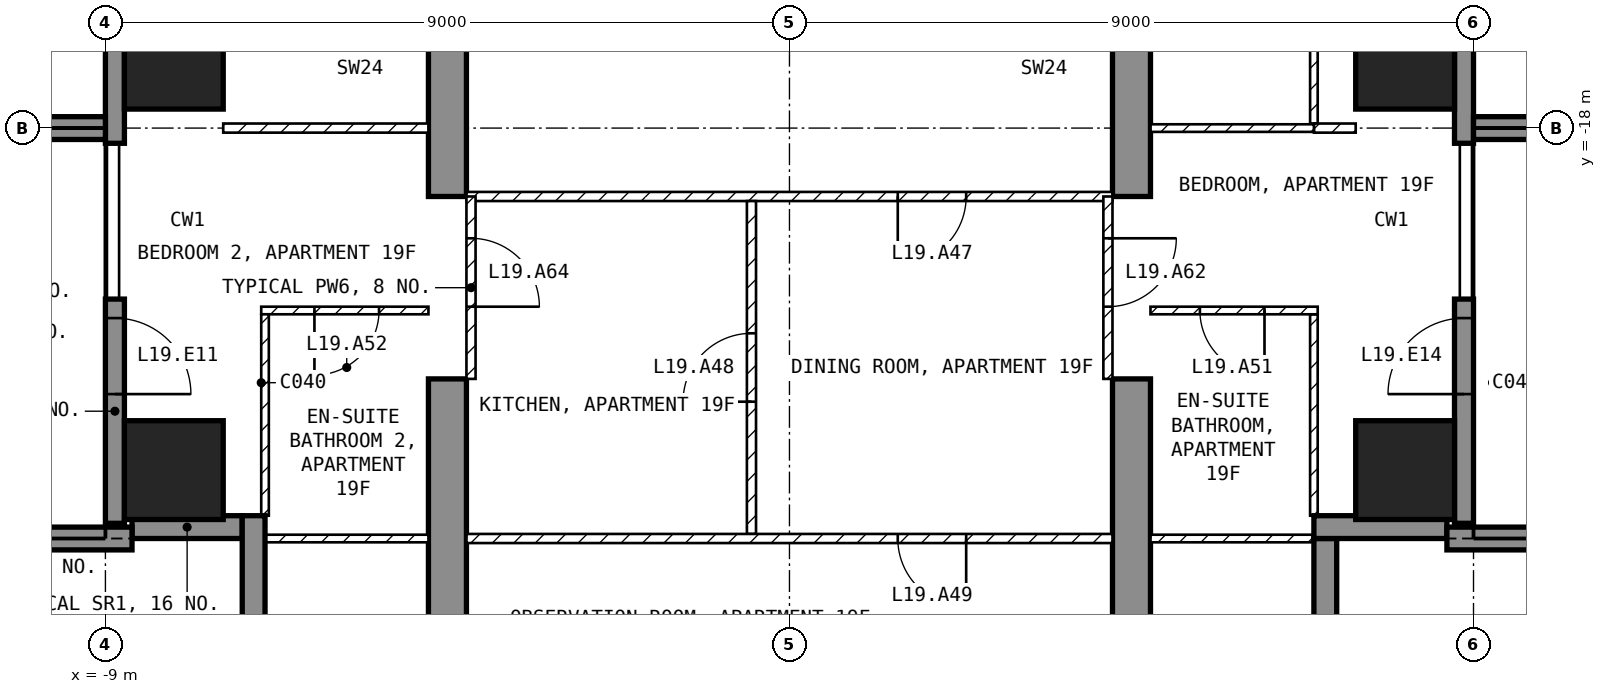
"""IFC4 building model, lengths in metres.
Left out: names, types, materials, properties, quantities, classifications, styles, units other than length and angle.
Written with IfcOpenShell. Run it as: python <this file> out.ifc"""

import sys

from ifc_helpers import new_model, si_unit, direction, frame, frame_2d, origin, origin_2d, place, context, subcontext, project, spatial, polyline, rectangle, outline, extrude, element, fill, save


model = new_model("IFC4")
c1 = context("Model", 3, precision=1e-05, world=origin(), true_north=direction((0.0, 1.0)))
c2 = subcontext(c1, "Body", "Model", "MODEL_VIEW")
j1 = project(units=[si_unit("LENGTHUNIT", "METRE"), si_unit("PLANEANGLEUNIT", "RADIAN")], contexts=[c1])
p1 = place(None, origin())
s1 = spatial("IfcSite", under=j1, at=p1, CompositionType="ELEMENT")
p2 = place(p1, origin())
s2 = spatial("IfcBuilding", under=s1, at=p2, CompositionType="ELEMENT")
p3 = place(p2, frame((0.0, 0.0, 85.5)))
s3 = spatial("IfcBuildingStorey", under=s2, at=p3, CompositionType="ELEMENT", Elevation=85.5)
for number, where, z_axis, x_axis in (
    (1, (-8.1, -22.5, -0.25), (0.0, 0.0, 1.0), (1.0, 0.0, 0.0)),
    (2, (-8.1, -17.1, -0.25), (0.0, 0.0, 1.0), (1.0, 0.0, 0.0)),
    (3, (8.1, -22.5, -0.25), (0.0, 0.0, 1.0), (1.0, 0.0, 0.0)),
    (4, (8.1, -17.1, -0.25), (0.0, 0.0, 1.0), (1.0, 0.0, 0.0)),
):
    element("IfcColumn", number, at=place(p3, frame(where, z_axis=z_axis, x_axis=x_axis)), inside=s3, PredefinedType="COLUMN", context=c2, shape_type="SweptSolid", body=[
        extrude(rectangle(XDim=1.3, YDim=1.3, at=origin_2d()), origin(), (0.0, 0.0, 1.0), 3.5),
    ])
for number, where, z_axis, x_axis in (
    (5, (-4.75, -25.45, -0.25), (1.0, 0.0, 0.0), (0.0, 1.0, 0.0)),
    (6, (4.25, -25.45, -0.25), (1.0, 0.0, 0.0), (0.0, 1.0, 0.0)),
):
    element("IfcWall", number, at=place(p3, frame(where, z_axis=z_axis, x_axis=x_axis)), inside=s3, PredefinedType="SHEAR", context=c2, shape_type="SweptSolid", body=[
        extrude(outline(polyline([(0.0, 0.0), (4.15, 0.0), (4.15, 2.65), (6.55, 2.65), (6.55, 0.0), (11.95, 0.0), (11.95, 2.65), (14.35, 2.65), (14.35, 0.0), (16.45, 0.0), (16.45, 3.5), (0.0, 3.5), (0.0, 0.0)])), origin(), (0.0, 0.0, 1.0), 0.5),
    ])
p4 = place(p3, frame((-8.875, -14.65, 0.0), z_axis=(0.0, 0.0, 1.0), x_axis=(0.0, -1.0, 0.0)))
e7 = element("IfcWall", 7, at=p4, inside=s3, PredefinedType="SOLIDWALL", context=c2, shape_type="SweptSolid", body=[
    extrude(rectangle(XDim=3.55, YDim=0.25, at=frame_2d((1.775, 0.0))), origin(), (0.0, 0.0, 1.0), 3.25),
])
p5 = place(p4, frame((0.25, 0.0, 0.0)))
e8 = element("IfcOpeningElement", 8, at=p5, cuts=e7, PredefinedType="OPENING", context=c2, shape_type="SweptSolid", body=[
    extrude(rectangle(XDim=1.2, YDim=2.4, at=frame_2d((0.6, 1.2))), frame((0.0, 0.135, 0.0), z_axis=(0.0, -1.0, 0.0), x_axis=(1.0, 0.0, 0.0)), (0.0, 0.0, 1.0), 0.27),
])
p6 = place(p3, frame((-8.875, -20.25, 0.0), z_axis=(0.0, 0.0, 1.0), x_axis=(0.0, -1.0, 0.0)))
e9 = element("IfcWall", 9, at=p6, inside=s3, PredefinedType="SOLIDWALL", context=c2, shape_type="SweptSolid", body=[
    extrude(rectangle(XDim=2.95, YDim=0.25, at=frame_2d((1.475, 0.0))), origin(), (0.0, 0.0, 1.0), 3.25),
])
p7 = place(p6, frame((0.25, 0.0, 0.0)))
e10 = element("IfcOpeningElement", 10, at=p7, cuts=e9, PredefinedType="OPENING", context=c2, shape_type="SweptSolid", body=[
    extrude(rectangle(XDim=1.0, YDim=2.4, at=frame_2d((0.5, 1.2))), frame((0.0, 0.135, 0.0), z_axis=(0.0, -1.0, 0.0), x_axis=(1.0, 0.0, 0.0)), (0.0, 0.0, 1.0), 0.27),
])
p8 = place(p3, frame((8.875, -23.2, 0.0), z_axis=(0.0, 0.0, 1.0), x_axis=(0.0, 1.0, 0.0)))
e11 = element("IfcWall", 11, at=p8, inside=s3, PredefinedType="SOLIDWALL", context=c2, shape_type="SweptSolid", body=[
    extrude(rectangle(XDim=2.95, YDim=0.25, at=frame_2d((1.475, 0.0))), origin(), (0.0, 0.0, 1.0), 3.25),
])
p9 = place(p8, frame((1.7, 0.0, 0.0)))
e12 = element("IfcOpeningElement", 12, at=p9, cuts=e11, PredefinedType="OPENING", context=c2, shape_type="SweptSolid", body=[
    extrude(rectangle(XDim=1.0, YDim=2.4, at=frame_2d((0.5, 1.2))), frame((0.0, 0.135, 0.0), z_axis=(0.0, -1.0, 0.0), x_axis=(1.0, 0.0, 0.0)), (0.0, 0.0, 1.0), 0.27),
])
p10 = place(p3, frame((8.875, -18.2, 0.0), z_axis=(0.0, 0.0, 1.0), x_axis=(0.0, 1.0, 0.0)))
e13 = element("IfcWall", 13, at=p10, inside=s3, PredefinedType="SOLIDWALL", context=c2, shape_type="SweptSolid", body=[
    extrude(rectangle(XDim=3.55, YDim=0.25, at=frame_2d((1.775, 0.0))), origin(), (0.0, 0.0, 1.0), 3.25),
])
p11 = place(p10, frame((2.1, 0.0, 0.0)))
e14 = element("IfcOpeningElement", 14, at=p11, cuts=e13, PredefinedType="OPENING", context=c2, shape_type="SweptSolid", body=[
    extrude(rectangle(XDim=1.2, YDim=2.4, at=frame_2d((0.6, 1.2))), frame((0.0, 0.135, 0.0), z_axis=(0.0, -1.0, 0.0), x_axis=(1.0, 0.0, 0.0)), (0.0, 0.0, 1.0), 0.27),
])
p12 = place(p3, frame((7.05, -25.2, 0.0), z_axis=(0.0, 0.0, 1.0), x_axis=(0.0, 1.0, 0.0)))
e15 = element("IfcWall", 15, at=p12, inside=s3, PredefinedType="SOLIDWALL", context=c2, shape_type="SweptSolid", body=[
    extrude(rectangle(XDim=1.8, YDim=0.3, at=frame_2d((0.9, 0.0))), origin(), (0.0, 0.0, 1.0), 3.25),
])
p13 = place(p3, frame((6.9, -23.25, 0.0), z_axis=(0.0, 0.0, 1.0), x_axis=(1.0, 0.0, 0.0)))
e16 = element("IfcWall", 16, at=p13, inside=s3, PredefinedType="SOLIDWALL", context=c2, shape_type="SweptSolid", body=[
    extrude(rectangle(XDim=1.75, YDim=0.3, at=frame_2d((0.875, 0.0))), origin(), (0.0, 0.0, 1.0), 3.25),
])
p14 = place(p3, frame((-8.65, -23.25, 0.0), z_axis=(0.0, 0.0, 1.0), x_axis=(1.0, 0.0, 0.0)))
e17 = element("IfcWall", 17, at=p14, inside=s3, PredefinedType="SOLIDWALL", context=c2, shape_type="SweptSolid", body=[
    extrude(rectangle(XDim=1.45, YDim=0.3, at=frame_2d((0.725, 0.0))), origin(), (0.0, 0.0, 1.0), 3.25),
])
p15 = place(p3, frame((-7.05, -23.1, 0.0), z_axis=(0.0, 0.0, 1.0), x_axis=(0.0, -1.0, 0.0)))
e18 = element("IfcWall", 18, at=p15, inside=s3, PredefinedType="SOLIDWALL", context=c2, shape_type="SweptSolid", body=[
    extrude(rectangle(XDim=1.8, YDim=0.3, at=frame_2d((0.9, 0.0))), origin(), (0.0, 0.0, 1.0), 3.25),
])
p16 = place(p3, frame((-8.65, -23.4, 0.0), z_axis=(0.0, 0.0, 1.0), x_axis=(-1.0, 0.0, 0.0)))
e19 = element("IfcWall", 19, at=p16, inside=s3, PredefinedType="SOLIDWALL", context=c2, shape_type="SweptSolid", body=[
    extrude(rectangle(XDim=3.05, YDim=0.3, at=frame_2d((1.525, 0.0))), origin(), (0.0, 0.0, 1.0), 3.25),
])
p17 = place(p3, frame((-9.0, -18.0, 0.0), z_axis=(0.0, 0.0, 1.0), x_axis=(-1.0, 0.0, 0.0)))
e20 = element("IfcWall", 20, at=p17, inside=s3, PredefinedType="SOLIDWALL", context=c2, shape_type="SweptSolid", body=[
    extrude(rectangle(XDim=2.7, YDim=0.3, at=frame_2d((1.35, 0.0))), origin(), (0.0, 0.0, 1.0), 3.25),
])
p18 = place(p3, frame((8.65, -23.4, 0.0), z_axis=(0.0, 0.0, 1.0), x_axis=(1.0, 0.0, 0.0)))
e21 = element("IfcWall", 21, at=p18, inside=s3, PredefinedType="SOLIDWALL", context=c2, shape_type="SweptSolid", body=[
    extrude(rectangle(XDim=3.05, YDim=0.3, at=frame_2d((1.525, 0.0))), origin(), (0.0, 0.0, 1.0), 3.25),
])
p19 = place(p3, frame((9.0, -18.0, 0.0), z_axis=(0.0, 0.0, 1.0), x_axis=(1.0, 0.0, 0.0)))
e22 = element("IfcWall", 22, at=p19, inside=s3, PredefinedType="SOLIDWALL", context=c2, shape_type="SweptSolid", body=[
    extrude(rectangle(XDim=2.7, YDim=0.3, at=frame_2d((1.35, 0.0))), origin(), (0.0, 0.0, 1.0), 3.25),
])
p20 = place(p3, frame((4.25, -18.9, 0.0), z_axis=(0.0, 0.0, 1.0), x_axis=(-1.0, 0.0, 0.0)))
e23 = element("IfcWall", 23, at=p20, inside=s3, PredefinedType="PARTITIONING", context=c2, shape_type="SweptSolid", body=[
    extrude(rectangle(XDim=8.5, YDim=0.12, at=frame_2d((4.25, 0.0))), origin(), (0.0, 0.0, 1.0), 3.25),
])
p21 = place(p20, frame((1.925, 0.0, 0.0)))
e24 = element("IfcOpeningElement", 24, at=p21, cuts=e23, PredefinedType="OPENING", context=c2, shape_type="SweptSolid", body=[
    extrude(rectangle(XDim=0.9, YDim=2.1, at=frame_2d((0.45, 1.05))), frame((0.0, 0.07, 0.0), z_axis=(0.0, -1.0, 0.0), x_axis=(1.0, 0.0, 0.0)), (0.0, 0.0, 1.0), 0.14),
])
p22 = place(p3, frame((-0.5, -23.34, 0.0), z_axis=(0.0, 0.0, 1.0), x_axis=(0.0, 1.0, 0.0)))
e25 = element("IfcWall", 25, at=p22, inside=s3, PredefinedType="PARTITIONING", context=c2, shape_type="SweptSolid", body=[
    extrude(rectangle(XDim=4.38, YDim=0.12, at=frame_2d((2.19, 0.0))), origin(), (0.0, 0.0, 1.0), 3.25),
])
p23 = place(p22, frame((1.74, 0.0, 0.0)))
e26 = element("IfcOpeningElement", 26, at=p23, cuts=e25, PredefinedType="OPENING", context=c2, shape_type="SweptSolid", body=[
    extrude(rectangle(XDim=0.9, YDim=2.1, at=frame_2d((0.45, 1.05))), frame((0.0, 0.07, 0.0), z_axis=(0.0, -1.0, 0.0), x_axis=(1.0, 0.0, 0.0)), (0.0, 0.0, 1.0), 0.14),
])
p24 = place(p3, frame((4.25, -23.4, 0.0), z_axis=(0.0, 0.0, 1.0), x_axis=(-1.0, 0.0, 0.0)))
e27 = element("IfcWall", 27, at=p24, inside=s3, PredefinedType="PARTITIONING", context=c2, shape_type="SweptSolid", body=[
    extrude(rectangle(XDim=8.5, YDim=0.12, at=frame_2d((4.25, 0.0))), origin(), (0.0, 0.0, 1.0), 3.25),
])
p25 = place(p24, frame((1.925, 0.0, 0.0)))
e28 = element("IfcOpeningElement", 28, at=p25, cuts=e27, PredefinedType="OPENING", context=c2, shape_type="SweptSolid", body=[
    extrude(rectangle(XDim=0.9, YDim=2.1, at=frame_2d((0.45, 1.05))), frame((0.0, 0.07, 0.0), z_axis=(0.0, -1.0, 0.0), x_axis=(1.0, 0.0, 0.0)), (0.0, 0.0, 1.0), 0.14),
])
p26 = place(p3, frame((6.9, -17.94, 0.0), z_axis=(0.0, 0.0, 1.0), x_axis=(0.0, 1.0, 0.0)))
e29 = element("IfcWall", 29, at=p26, inside=s3, PredefinedType="PARTITIONING", context=c2, shape_type="SweptSolid", body=[
    extrude(rectangle(XDim=3.49, YDim=0.1, at=frame_2d((1.745, 0.0))), origin(), (0.0, 0.0, 1.0), 3.25),
])
p27 = place(p3, frame((7.45, -18.0, 0.0), z_axis=(0.0, 0.0, 1.0), x_axis=(-1.0, 0.0, 0.0)))
e30 = element("IfcWall", 30, at=p27, inside=s3, PredefinedType="PARTITIONING", context=c2, shape_type="SweptSolid", body=[
    extrude(rectangle(XDim=0.55, YDim=0.12, at=frame_2d((0.275, 0.0))), origin(), (0.0, 0.0, 1.0), 3.25),
])
p28 = place(p3, frame((6.9, -18.0, 0.0), z_axis=(0.0, 0.0, 1.0), x_axis=(-1.0, 0.0, 0.0)))
e31 = element("IfcWall", 31, at=p28, inside=s3, PredefinedType="PARTITIONING", context=c2, shape_type="SweptSolid", body=[
    extrude(rectangle(XDim=2.15, YDim=0.1, at=frame_2d((1.075, 0.0))), origin(), (0.0, 0.0, 1.0), 3.25),
])
p29 = place(p3, frame((6.9, -23.1, 0.0), z_axis=(0.0, 0.0, 1.0), x_axis=(0.0, 1.0, 0.0)))
e32 = element("IfcWall", 32, at=p29, inside=s3, PredefinedType="PARTITIONING", context=c2, shape_type="SweptSolid", body=[
    extrude(rectangle(XDim=2.65, YDim=0.1, at=frame_2d((1.325, 0.0))), origin(), (0.0, 0.0, 1.0), 3.25),
])
p30 = place(p3, frame((6.95, -20.4, 0.0), z_axis=(0.0, 0.0, 1.0), x_axis=(-1.0, 0.0, 0.0)))
e33 = element("IfcWall", 33, at=p30, inside=s3, PredefinedType="PARTITIONING", context=c2, shape_type="SweptSolid", body=[
    extrude(rectangle(XDim=2.2, YDim=0.1, at=frame_2d((1.1, 0.0))), origin(), (0.0, 0.0, 1.0), 3.25),
])
p31 = place(p30, frame((0.7, 0.0, 0.0)))
e34 = element("IfcOpeningElement", 34, at=p31, cuts=e33, PredefinedType="OPENING", context=c2, shape_type="SweptSolid", body=[
    extrude(rectangle(XDim=0.85, YDim=2.1, at=frame_2d((0.425, 1.05))), frame((0.0, 0.06, 0.0), z_axis=(0.0, -1.0, 0.0), x_axis=(1.0, 0.0, 0.0)), (0.0, 0.0, 1.0), 0.12),
])
p32 = place(p3, frame((7.12, -23.4, 0.0), z_axis=(0.0, 0.0, 1.0), x_axis=(-1.0, 0.0, 0.0)))
e35 = element("IfcWall", 35, at=p32, inside=s3, PredefinedType="PARTITIONING", context=c2, shape_type="SweptSolid", body=[
    extrude(rectangle(XDim=2.37, YDim=0.1, at=frame_2d((1.185, 0.0))), origin(), (0.0, 0.0, 1.0), 3.25),
])
p33 = place(p3, frame((-4.75, -18.0, 0.0), z_axis=(0.0, 0.0, 1.0), x_axis=(-1.0, 0.0, 0.0)))
e36 = element("IfcWall", 36, at=p33, inside=s3, PredefinedType="PARTITIONING", context=c2, shape_type="SweptSolid", body=[
    extrude(rectangle(XDim=2.7, YDim=0.12, at=frame_2d((1.35, 0.0))), origin(), (0.0, 0.0, 1.0), 3.25),
])
p34 = place(p3, frame((-4.75, -20.4, 0.0), z_axis=(0.0, 0.0, 1.0), x_axis=(-1.0, 0.0, 0.0)))
e37 = element("IfcWall", 37, at=p34, inside=s3, PredefinedType="PARTITIONING", context=c2, shape_type="SweptSolid", body=[
    extrude(rectangle(XDim=2.2, YDim=0.1, at=frame_2d((1.1, 0.0))), origin(), (0.0, 0.0, 1.0), 3.25),
])
p35 = place(p34, frame((0.65, 0.0, 0.0)))
e38 = element("IfcOpeningElement", 38, at=p35, cuts=e37, PredefinedType="OPENING", context=c2, shape_type="SweptSolid", body=[
    extrude(rectangle(XDim=0.85, YDim=2.1, at=frame_2d((0.425, 1.05))), frame((0.0, 0.06, 0.0), z_axis=(0.0, -1.0, 0.0), x_axis=(1.0, 0.0, 0.0)), (0.0, 0.0, 1.0), 0.12),
])
p36 = place(p3, frame((-6.9, -20.45, 0.0), z_axis=(0.0, 0.0, 1.0), x_axis=(0.0, -1.0, 0.0)))
e39 = element("IfcWall", 39, at=p36, inside=s3, PredefinedType="PARTITIONING", context=c2, shape_type="SweptSolid", body=[
    extrude(rectangle(XDim=2.65, YDim=0.1, at=frame_2d((1.325, 0.0))), origin(), (0.0, 0.0, 1.0), 3.25),
])
p37 = place(p3, frame((-4.75, -23.4, 0.0), z_axis=(0.0, 0.0, 1.0), x_axis=(-1.0, 0.0, 0.0)))
e40 = element("IfcWall", 40, at=p37, inside=s3, PredefinedType="PARTITIONING", context=c2, shape_type="SweptSolid", body=[
    extrude(rectangle(XDim=2.37, YDim=0.1, at=frame_2d((1.185, 0.0))), origin(), (0.0, 0.0, 1.0), 3.25),
])
p38 = place(p3, frame((4.19, -18.9, 0.0), z_axis=(0.0, 0.0, 1.0), x_axis=(0.0, -1.0, 0.0)))
e41 = element("IfcWall", 41, at=p38, inside=s3, PredefinedType="PARTITIONING", context=c2, shape_type="SweptSolid", body=[
    extrude(rectangle(XDim=2.4, YDim=0.12, at=frame_2d((1.2, 0.0))), origin(), (0.0, 0.0, 1.0), 2.4),
])
p39 = place(p38, frame((0.55, 0.0, 0.0)))
e42 = element("IfcOpeningElement", 42, at=p39, cuts=e41, PredefinedType="OPENING", context=c2, shape_type="SweptSolid", body=[
    extrude(rectangle(XDim=0.9, YDim=2.1, at=frame_2d((0.45, 1.05))), frame((0.0, 0.07, 0.0), z_axis=(0.0, -1.0, 0.0), x_axis=(1.0, 0.0, 0.0)), (0.0, 0.0, 1.0), 0.14),
])
p40 = place(p3, frame((-4.19, -18.9, 0.0), z_axis=(0.0, 0.0, 1.0), x_axis=(0.0, -1.0, 0.0)))
e43 = element("IfcWall", 43, at=p40, inside=s3, PredefinedType="PARTITIONING", context=c2, shape_type="SweptSolid", body=[
    extrude(rectangle(XDim=2.4, YDim=0.12, at=frame_2d((1.2, 0.0))), origin(), (0.0, 0.0, 1.0), 2.4),
])
p41 = place(p40, frame((0.55, 0.0, 0.0)))
e44 = element("IfcOpeningElement", 44, at=p41, cuts=e43, PredefinedType="OPENING", context=c2, shape_type="SweptSolid", body=[
    extrude(rectangle(XDim=0.9, YDim=2.1, at=frame_2d((0.45, 1.05))), frame((0.0, 0.07, 0.0), z_axis=(0.0, -1.0, 0.0), x_axis=(1.0, 0.0, 0.0)), (0.0, 0.0, 1.0), 0.14),
])
p42 = place(p7, origin())
e45 = element("IfcDoor", 45, at=p42, inside=s3, OperationType="SINGLE_SWING_RIGHT", PredefinedType="DOOR", context=c2, shape_type="SweptSolid", body=[
    extrude(rectangle(XDim=1.0, YDim=2.4, at=frame_2d((0.5, 1.2))), frame((0.0, 0.025, 0.0), z_axis=(0.0, -1.0, 0.0), x_axis=(1.0, 0.0, 0.0)), (0.0, 0.0, 1.0), 0.05),
])
fill(e10, e45)
p43 = place(p9, origin())
e46 = element("IfcDoor", 46, at=p43, inside=s3, OperationType="SINGLE_SWING_LEFT", PredefinedType="DOOR", context=c2, shape_type="SweptSolid", body=[
    extrude(rectangle(XDim=1.0, YDim=2.4, at=frame_2d((0.5, 1.2))), frame((0.0, 0.025, 0.0), z_axis=(0.0, -1.0, 0.0), x_axis=(1.0, 0.0, 0.0)), (0.0, 0.0, 1.0), 0.05),
])
fill(e12, e46)
p44 = place(p21, origin())
e47 = element("IfcDoor", 47, at=p44, inside=s3, OperationType="SINGLE_SWING_RIGHT", PredefinedType="DOOR", context=c2, shape_type="SweptSolid", body=[
    extrude(rectangle(XDim=0.9, YDim=2.1, at=frame_2d((0.45, 1.05))), frame((0.0, 0.025, 0.0), z_axis=(0.0, -1.0, 0.0), x_axis=(1.0, 0.0, 0.0)), (0.0, 0.0, 1.0), 0.05),
])
fill(e24, e47)
p45 = place(p23, origin())
e48 = element("IfcDoor", 48, at=p45, inside=s3, OperationType="SINGLE_SWING_LEFT", PredefinedType="DOOR", context=c2, shape_type="SweptSolid", body=[
    extrude(rectangle(XDim=0.9, YDim=2.1, at=frame_2d((0.45, 1.05))), frame((0.0, 0.025, 0.0), z_axis=(0.0, -1.0, 0.0), x_axis=(1.0, 0.0, 0.0)), (0.0, 0.0, 1.0), 0.05),
])
fill(e26, e48)
p46 = place(p25, origin())
e49 = element("IfcDoor", 49, at=p46, inside=s3, OperationType="SINGLE_SWING_LEFT", PredefinedType="DOOR", context=c2, shape_type="SweptSolid", body=[
    extrude(rectangle(XDim=0.9, YDim=2.1, at=frame_2d((0.45, 1.05))), frame((0.0, 0.025, 0.0), z_axis=(0.0, -1.0, 0.0), x_axis=(1.0, 0.0, 0.0)), (0.0, 0.0, 1.0), 0.05),
])
fill(e28, e49)
p47 = place(p31, origin())
e50 = element("IfcDoor", 50, at=p47, inside=s3, OperationType="SINGLE_SWING_LEFT", PredefinedType="DOOR", context=c2, shape_type="SweptSolid", body=[
    extrude(rectangle(XDim=0.85, YDim=2.1, at=frame_2d((0.425, 1.05))), frame((0.0, 0.025, 0.0), z_axis=(0.0, -1.0, 0.0), x_axis=(1.0, 0.0, 0.0)), (0.0, 0.0, 1.0), 0.05),
])
fill(e34, e50)
p48 = place(p35, origin())
e51 = element("IfcDoor", 51, at=p48, inside=s3, OperationType="SINGLE_SWING_RIGHT", PredefinedType="DOOR", context=c2, shape_type="SweptSolid", body=[
    extrude(rectangle(XDim=0.85, YDim=2.1, at=frame_2d((0.425, 1.05))), frame((0.0, 0.025, 0.0), z_axis=(0.0, -1.0, 0.0), x_axis=(1.0, 0.0, 0.0)), (0.0, 0.0, 1.0), 0.05),
])
fill(e38, e51)
p49 = place(p39, origin())
e52 = element("IfcDoor", 52, at=p49, inside=s3, OperationType="SINGLE_SWING_LEFT", PredefinedType="DOOR", context=c2, shape_type="SweptSolid", body=[
    extrude(rectangle(XDim=0.9, YDim=2.1, at=frame_2d((0.45, 1.05))), frame((0.0, 0.025, 0.0), z_axis=(0.0, -1.0, 0.0), x_axis=(1.0, 0.0, 0.0)), (0.0, 0.0, 1.0), 0.05),
])
fill(e42, e52)
p50 = place(p41, origin())
e53 = element("IfcDoor", 53, at=p50, inside=s3, OperationType="SINGLE_SWING_RIGHT", PredefinedType="DOOR", context=c2, shape_type="SweptSolid", body=[
    extrude(rectangle(XDim=0.9, YDim=2.1, at=frame_2d((0.45, 1.05))), frame((0.0, 0.025, 0.0), z_axis=(0.0, -1.0, 0.0), x_axis=(1.0, 0.0, 0.0)), (0.0, 0.0, 1.0), 0.05),
])
fill(e44, e53)
save(model, sys.argv[1])
